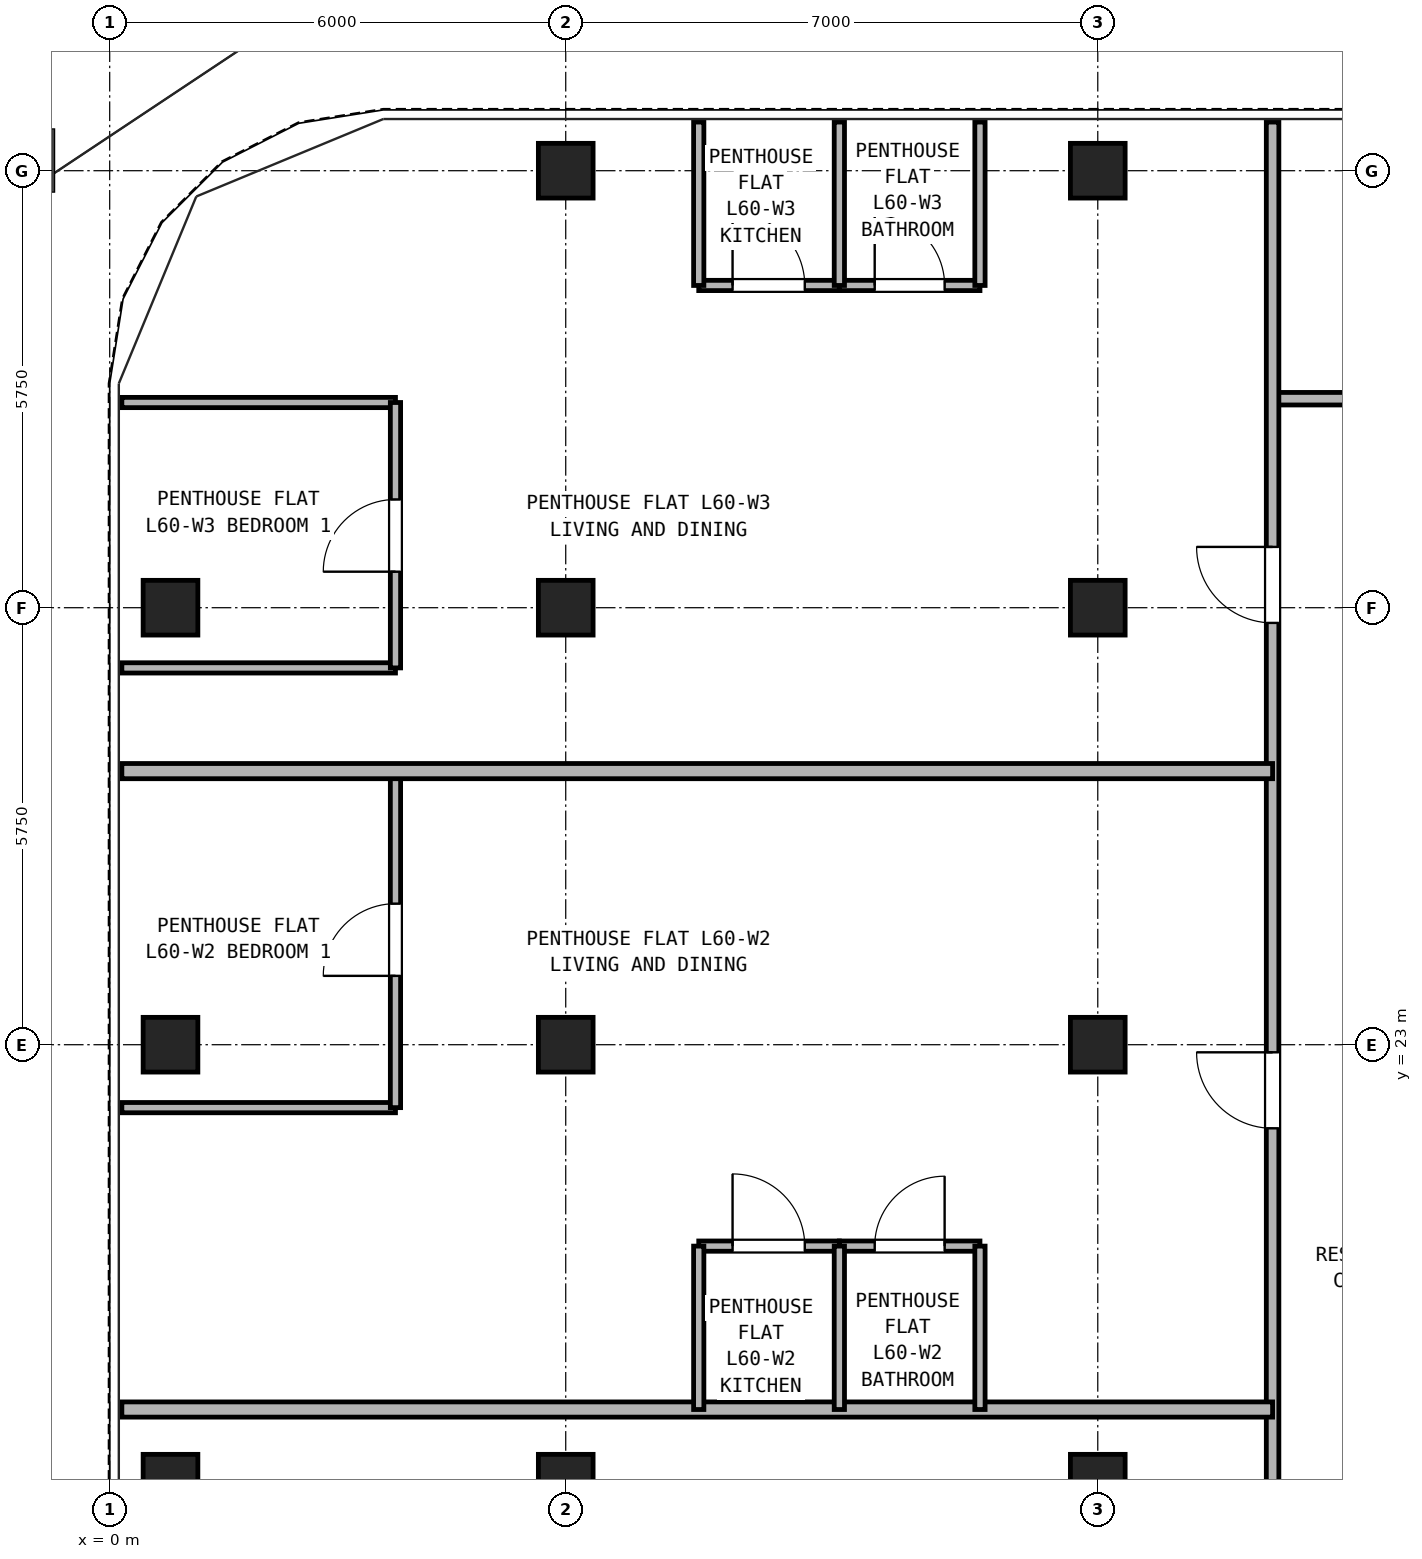
"""IFC4 building model, lengths in metres.
Left out: names, types, materials, properties, quantities, classifications, styles, units other than length and angle.
Written with IfcOpenShell. Run it as: python <this file> out.ifc"""

import sys

from ifc_helpers import new_model, si_unit, direction, frame, frame_2d, origin, origin_2d, place, context, subcontext, project, spatial, rectangle, hollow_rectangle, extrude, source, transform, mapped, element, fill, save


model = new_model("IFC4")
c1 = context("Model", 3, precision=1e-05, world=origin(), true_north=direction((0.0, 1.0)))
c2 = subcontext(c1, "Body", "Model", "MODEL_VIEW")
j1 = project(units=[si_unit("LENGTHUNIT", "METRE"), si_unit("PLANEANGLEUNIT", "RADIAN")], contexts=[c1])
p1 = place(None, origin())
s1 = spatial("IfcSite", under=j1, at=p1, CompositionType="ELEMENT")
p2 = place(p1, origin())
s2 = spatial("IfcBuilding", under=s1, at=p2, CompositionType="ELEMENT")
p3 = place(p2, frame((0.0, 0.0, 212.4)))
s3 = spatial("IfcBuildingStorey", under=s2, at=p3, CompositionType="ELEMENT", Elevation=212.4)
m1 = source(origin(), c2, "Body", "SweptSolid", [
    extrude(hollow_rectangle(XDim=0.72, YDim=0.72, WallThickness=0.04, at=origin_2d()), origin(), (0.0, 0.0, 1.0), 2.84),
])
for number, where, z_axis, x_axis in (
    (1, (6.0, 34.5, 0.0), (0.0, 0.0, 1.0), (1.0, 0.0, 0.0)),
    (2, (13.0, 34.5, 0.0), (0.0, 0.0, 1.0), (1.0, 0.0, 0.0)),
    (3, (0.8, 17.25, 0.0), (0.0, 0.0, 1.0), (1.0, 0.0, 0.0)),
    (4, (0.8, 23.0, 0.0), (0.0, 0.0, 1.0), (1.0, 0.0, 0.0)),
    (5, (0.8, 28.75, 0.0), (0.0, 0.0, 1.0), (1.0, 0.0, 0.0)),
    (6, (6.0, 17.25, 0.0), (0.0, 0.0, 1.0), (1.0, 0.0, 0.0)),
    (7, (6.0, 23.0, 0.0), (0.0, 0.0, 1.0), (1.0, 0.0, 0.0)),
    (8, (6.0, 28.75, 0.0), (0.0, 0.0, 1.0), (1.0, 0.0, 0.0)),
    (9, (13.0, 17.25, 0.0), (0.0, 0.0, 1.0), (1.0, 0.0, 0.0)),
    (10, (13.0, 23.0, 0.0), (0.0, 0.0, 1.0), (1.0, 0.0, 0.0)),
    (11, (13.0, 28.75, 0.0), (0.0, 0.0, 1.0), (1.0, 0.0, 0.0)),
):
    element("IfcColumn", number, at=place(p3, frame(where, z_axis=z_axis, x_axis=x_axis)), inside=s3, PredefinedType="COLUMN", context=c2, shape_type="MappedRepresentation", body=[
        mapped(m1, transform((0.0, 0.0, 0.0), x_axis=(1.0, 0.0, 0.0), y_axis=(0.0, 1.0, 0.0), z_axis=(0.0, 0.0, 1.0), scale=1.0)),
    ])
p4 = place(p3, frame((15.3, 31.5, 0.0), z_axis=(0.0, 0.0, 1.0), x_axis=(1.0, 0.0, 0.0)))
e12 = element("IfcWall", 12, at=p4, inside=s3, PredefinedType="PARTITIONING", context=c2, shape_type="SweptSolid", body=[
    extrude(rectangle(XDim=16.4, YDim=0.165, at=frame_2d((8.2, 0.0))), origin(), (0.0, 0.0, 1.0), 2.473),
])
p5 = place(p4, frame((2.6, 0.0, 0.0)))
e13 = element("IfcOpeningElement", 13, at=p5, cuts=e12, PredefinedType="OPENING", context=c2, shape_type="SweptSolid", body=[
    extrude(rectangle(XDim=0.95, YDim=2.15, at=frame_2d((0.475, 1.075))), frame((0.0, 0.093, 0.0), z_axis=(0.0, -1.0, 0.0), x_axis=(1.0, 0.0, 0.0)), (0.0, 0.0, 1.0), 0.185),
])
p6 = place(p4, frame((7.9, 0.0, 0.0)))
e14 = element("IfcOpeningElement", 14, at=p6, cuts=e12, PredefinedType="OPENING", context=c2, shape_type="SweptSolid", body=[
    extrude(rectangle(XDim=0.95, YDim=2.15, at=frame_2d((0.475, 1.075))), frame((0.0, 0.093, 0.0), z_axis=(0.0, -1.0, 0.0), x_axis=(1.0, 0.0, 0.0)), (0.0, 0.0, 1.0), 0.185),
])
p7 = place(p4, frame((13.0, 0.0, 0.0)))
e15 = element("IfcOpeningElement", 15, at=p7, cuts=e12, PredefinedType="OPENING", context=c2, shape_type="SweptSolid", body=[
    extrude(rectangle(XDim=0.92, YDim=2.1, at=frame_2d((0.46, 1.05))), frame((0.0, 0.093, 0.0), z_axis=(0.0, -1.0, 0.0), x_axis=(1.0, 0.0, 0.0)), (0.0, 0.0, 1.0), 0.185),
])
p8 = place(p3, frame((15.3, 10.75, 0.0), z_axis=(0.0, 0.0, 1.0), x_axis=(0.0, 1.0, 0.0)))
e16 = element("IfcWall", 16, at=p8, inside=s3, PredefinedType="PARTITIONING", context=c2, shape_type="SweptSolid", body=[
    extrude(rectangle(XDim=24.39, YDim=0.165, at=frame_2d((12.195, 0.0))), origin(), (0.0, 0.0, 1.0), 2.84),
])
p9 = place(p8, frame((3.225, 0.0, 0.0)))
e17 = element("IfcOpeningElement", 17, at=p9, cuts=e16, PredefinedType="OPENING", context=c2, shape_type="SweptSolid", body=[
    extrude(rectangle(XDim=1.0, YDim=2.15, at=frame_2d((0.5, 1.075))), frame((0.0, 0.093, 0.0), z_axis=(0.0, -1.0, 0.0), x_axis=(1.0, 0.0, 0.0)), (0.0, 0.0, 1.0), 0.185),
])
p10 = place(p8, frame((11.15, 0.0, 0.0)))
e18 = element("IfcOpeningElement", 18, at=p10, cuts=e16, PredefinedType="OPENING", context=c2, shape_type="SweptSolid", body=[
    extrude(rectangle(XDim=1.0, YDim=2.15, at=frame_2d((0.5, 1.075))), frame((0.0, 0.093, 0.0), z_axis=(0.0, -1.0, 0.0), x_axis=(1.0, 0.0, 0.0)), (0.0, 0.0, 1.0), 0.185),
])
p11 = place(p8, frame((17.8, 0.0, 0.0)))
e19 = element("IfcOpeningElement", 19, at=p11, cuts=e16, PredefinedType="OPENING", context=c2, shape_type="SweptSolid", body=[
    extrude(rectangle(XDim=1.0, YDim=2.15, at=frame_2d((0.5, 1.075))), frame((0.0, 0.093, 0.0), z_axis=(0.0, -1.0, 0.0), x_axis=(1.0, 0.0, 0.0)), (0.0, 0.0, 1.0), 0.185),
])
p12 = place(p3, frame((0.16, 18.2, 0.0), z_axis=(0.0, 0.0, 1.0), x_axis=(1.0, 0.0, 0.0)))
e20 = element("IfcWall", 20, at=p12, inside=s3, PredefinedType="PARTITIONING", context=c2, shape_type="SweptSolid", body=[
    extrude(rectangle(XDim=15.14, YDim=0.2, at=frame_2d((7.57, 0.0))), origin(), (0.0, 0.0, 1.0), 2.84),
])
p13 = place(p3, frame((7.75, 20.35, 0.0), z_axis=(0.0, 0.0, 1.0), x_axis=(1.0, 0.0, 0.0)))
e21 = element("IfcWall", 21, at=p13, inside=s3, PredefinedType="PARTITIONING", context=c2, shape_type="SweptSolid", body=[
    extrude(rectangle(XDim=1.85, YDim=0.135, at=frame_2d((0.925, 0.0))), origin(), (0.0, 0.0, 1.0), 2.473),
])
p14 = place(p13, frame((0.445, 0.0, 0.0)))
e22 = element("IfcOpeningElement", 22, at=p14, cuts=e21, PredefinedType="OPENING", context=c2, shape_type="SweptSolid", body=[
    extrude(rectangle(XDim=0.95, YDim=2.15, at=frame_2d((0.475, 1.075))), frame((0.0, 0.077, 0.0), z_axis=(0.0, -1.0, 0.0), x_axis=(1.0, 0.0, 0.0)), (0.0, 0.0, 1.0), 0.155),
])
p15 = place(p3, frame((9.6, 20.35, 0.0), z_axis=(0.0, 0.0, 1.0), x_axis=(1.0, 0.0, 0.0)))
e23 = element("IfcWall", 23, at=p15, inside=s3, PredefinedType="PARTITIONING", context=c2, shape_type="SweptSolid", body=[
    extrude(rectangle(XDim=1.85, YDim=0.135, at=frame_2d((0.925, 0.0))), origin(), (0.0, 0.0, 1.0), 2.473),
])
p16 = place(p15, frame((0.465, 0.0, 0.0)))
e24 = element("IfcOpeningElement", 24, at=p16, cuts=e23, PredefinedType="OPENING", context=c2, shape_type="SweptSolid", body=[
    extrude(rectangle(XDim=0.92, YDim=2.1, at=frame_2d((0.46, 1.05))), frame((0.0, 0.077, 0.0), z_axis=(0.0, -1.0, 0.0), x_axis=(1.0, 0.0, 0.0)), (0.0, 0.0, 1.0), 0.155),
])
for number, where, z_axis, x_axis in (
    (25, (7.75, 18.2, 0.0), (0.0, 0.0, 1.0), (0.0, 1.0, 0.0)),
    (26, (9.6, 18.2, 0.0), (0.0, 0.0, 1.0), (0.0, 1.0, 0.0)),
    (27, (11.45, 18.2, 0.0), (0.0, 0.0, 1.0), (0.0, 1.0, 0.0)),
):
    element("IfcWall", number, at=place(p3, frame(where, z_axis=z_axis, x_axis=x_axis)), inside=s3, PredefinedType="PARTITIONING", context=c2, shape_type="SweptSolid", body=[
        extrude(rectangle(XDim=2.15, YDim=0.135, at=frame_2d((1.075, 0.0))), origin(), (0.0, 0.0, 1.0), 2.84),
    ])
p17 = place(p3, frame((0.16, 22.172, 0.0), z_axis=(0.0, 0.0, 1.0), x_axis=(1.0, 0.0, 0.0)))
e28 = element("IfcWall", 28, at=p17, inside=s3, PredefinedType="PARTITIONING", context=c2, shape_type="SweptSolid", body=[
    extrude(rectangle(XDim=3.6, YDim=0.135, at=frame_2d((1.8, 0.0))), origin(), (0.0, 0.0, 1.0), 2.84),
])
p18 = place(p3, frame((3.76, 22.172, 0.0), z_axis=(0.0, 0.0, 1.0), x_axis=(0.0, 1.0, 0.0)))
e29 = element("IfcWall", 29, at=p18, inside=s3, PredefinedType="PARTITIONING", context=c2, shape_type="SweptSolid", body=[
    extrude(rectangle(XDim=4.428, YDim=0.135, at=frame_2d((2.214, 0.0))), origin(), (0.0, 0.0, 1.0), 2.84),
])
p19 = place(p18, frame((1.734, 0.0, 0.0)))
e30 = element("IfcOpeningElement", 30, at=p19, cuts=e29, PredefinedType="OPENING", context=c2, shape_type="SweptSolid", body=[
    extrude(rectangle(XDim=0.95, YDim=2.15, at=frame_2d((0.475, 1.075))), frame((0.0, 0.077, 0.0), z_axis=(0.0, -1.0, 0.0), x_axis=(1.0, 0.0, 0.0)), (0.0, 0.0, 1.0), 0.155),
])
p20 = place(p3, frame((0.16, 26.6, 0.0), z_axis=(0.0, 0.0, 1.0), x_axis=(1.0, 0.0, 0.0)))
e31 = element("IfcWall", 31, at=p20, inside=s3, PredefinedType="PARTITIONING", context=c2, shape_type="SweptSolid", body=[
    extrude(rectangle(XDim=15.14, YDim=0.2, at=frame_2d((7.57, 0.0))), origin(), (0.0, 0.0, 1.0), 2.84),
])
p21 = place(p3, frame((7.75, 32.99, 0.0), z_axis=(0.0, 0.0, 1.0), x_axis=(1.0, 0.0, 0.0)))
e32 = element("IfcWall", 32, at=p21, inside=s3, PredefinedType="PARTITIONING", context=c2, shape_type="SweptSolid", body=[
    extrude(rectangle(XDim=1.85, YDim=0.135, at=frame_2d((0.925, 0.0))), origin(), (0.0, 0.0, 1.0), 2.84),
])
p22 = place(p21, frame((0.445, 0.0, 0.0)))
e33 = element("IfcOpeningElement", 33, at=p22, cuts=e32, PredefinedType="OPENING", context=c2, shape_type="SweptSolid", body=[
    extrude(rectangle(XDim=0.95, YDim=2.15, at=frame_2d((0.475, 1.075))), frame((0.0, 0.077, 0.0), z_axis=(0.0, -1.0, 0.0), x_axis=(1.0, 0.0, 0.0)), (0.0, 0.0, 1.0), 0.155),
])
p23 = place(p3, frame((9.6, 32.99, 0.0), z_axis=(0.0, 0.0, 1.0), x_axis=(1.0, 0.0, 0.0)))
e34 = element("IfcWall", 34, at=p23, inside=s3, PredefinedType="PARTITIONING", context=c2, shape_type="SweptSolid", body=[
    extrude(rectangle(XDim=1.85, YDim=0.135, at=frame_2d((0.925, 0.0))), origin(), (0.0, 0.0, 1.0), 2.84),
])
p24 = place(p23, frame((0.465, 0.0, 0.0)))
e35 = element("IfcOpeningElement", 35, at=p24, cuts=e34, PredefinedType="OPENING", context=c2, shape_type="SweptSolid", body=[
    extrude(rectangle(XDim=0.92, YDim=2.1, at=frame_2d((0.46, 1.05))), frame((0.0, 0.077, 0.0), z_axis=(0.0, -1.0, 0.0), x_axis=(1.0, 0.0, 0.0)), (0.0, 0.0, 1.0), 0.155),
])
for number, where, z_axis, x_axis in (
    (36, (7.75, 32.99, 0.0), (0.0, 0.0, 1.0), (0.0, 1.0, 0.0)),
    (37, (9.6, 32.99, 0.0), (0.0, 0.0, 1.0), (0.0, 1.0, 0.0)),
    (38, (11.45, 32.99, 0.0), (0.0, 0.0, 1.0), (0.0, 1.0, 0.0)),
):
    element("IfcWall", number, at=place(p3, frame(where, z_axis=z_axis, x_axis=x_axis)), inside=s3, PredefinedType="PARTITIONING", context=c2, shape_type="SweptSolid", body=[
        extrude(rectangle(XDim=2.15, YDim=0.135, at=frame_2d((1.075, 0.0))), origin(), (0.0, 0.0, 1.0), 2.84),
    ])
for number, where, z_axis, x_axis in (
    (39, (0.16, 27.958, 0.0), (0.0, 0.0, 1.0), (1.0, 0.0, 0.0)),
    (40, (0.16, 31.45, 0.0), (0.0, 0.0, 1.0), (1.0, 0.0, 0.0)),
):
    element("IfcWall", number, at=place(p3, frame(where, z_axis=z_axis, x_axis=x_axis)), inside=s3, PredefinedType="PARTITIONING", context=c2, shape_type="SweptSolid", body=[
        extrude(rectangle(XDim=3.6, YDim=0.135, at=frame_2d((1.8, 0.0))), origin(), (0.0, 0.0, 1.0), 2.84),
    ])
p25 = place(p3, frame((3.76, 27.958, 0.0), z_axis=(0.0, 0.0, 1.0), x_axis=(0.0, 1.0, 0.0)))
e41 = element("IfcWall", 41, at=p25, inside=s3, PredefinedType="PARTITIONING", context=c2, shape_type="SweptSolid", body=[
    extrude(rectangle(XDim=3.492, YDim=0.135, at=frame_2d((1.746, 0.0))), origin(), (0.0, 0.0, 1.0), 2.84),
])
p26 = place(p25, frame((1.266, 0.0, 0.0)))
e42 = element("IfcOpeningElement", 42, at=p26, cuts=e41, PredefinedType="OPENING", context=c2, shape_type="SweptSolid", body=[
    extrude(rectangle(XDim=0.95, YDim=2.15, at=frame_2d((0.475, 1.075))), frame((0.0, 0.077, 0.0), z_axis=(0.0, -1.0, 0.0), x_axis=(1.0, 0.0, 0.0)), (0.0, 0.0, 1.0), 0.155),
])
p27 = place(p14, origin())
e43 = element("IfcDoor", 43, at=p27, inside=s3, OperationType="SINGLE_SWING_LEFT", PredefinedType="DOOR", context=c2, shape_type="SweptSolid", body=[
    extrude(rectangle(XDim=0.95, YDim=2.15, at=frame_2d((0.475, 1.075))), frame((0.0, 0.025, 0.0), z_axis=(0.0, -1.0, 0.0), x_axis=(1.0, 0.0, 0.0)), (0.0, 0.0, 1.0), 0.05),
])
fill(e22, e43)
p28 = place(p16, origin())
e44 = element("IfcDoor", 44, at=p28, inside=s3, OperationType="SINGLE_SWING_RIGHT", PredefinedType="DOOR", context=c2, shape_type="SweptSolid", body=[
    extrude(rectangle(XDim=0.92, YDim=2.1, at=frame_2d((0.46, 1.05))), frame((0.0, 0.025, 0.0), z_axis=(0.0, -1.0, 0.0), x_axis=(1.0, 0.0, 0.0)), (0.0, 0.0, 1.0), 0.05),
])
fill(e24, e44)
p29 = place(p19, origin())
e45 = element("IfcDoor", 45, at=p29, inside=s3, OperationType="SINGLE_SWING_LEFT", PredefinedType="DOOR", context=c2, shape_type="SweptSolid", body=[
    extrude(rectangle(XDim=0.95, YDim=2.15, at=frame_2d((0.475, 1.075))), frame((0.0, 0.025, 0.0), z_axis=(0.0, -1.0, 0.0), x_axis=(1.0, 0.0, 0.0)), (0.0, 0.0, 1.0), 0.05),
])
fill(e30, e45)
p30 = place(p10, origin())
e46 = element("IfcDoor", 46, at=p30, inside=s3, OperationType="SINGLE_SWING_RIGHT", PredefinedType="DOOR", context=c2, shape_type="SweptSolid", body=[
    extrude(rectangle(XDim=1.0, YDim=2.15, at=frame_2d((0.5, 1.075))), frame((0.0, 0.025, 0.0), z_axis=(0.0, -1.0, 0.0), x_axis=(1.0, 0.0, 0.0)), (0.0, 0.0, 1.0), 0.05),
])
fill(e18, e46)
p31 = place(p22, frame((0.95, 0.0, 0.0), z_axis=(0.0, 0.0, 1.0), x_axis=(-1.0, 0.0, 0.0)))
e47 = element("IfcDoor", 47, at=p31, inside=s3, OperationType="SINGLE_SWING_LEFT", PredefinedType="DOOR", context=c2, shape_type="SweptSolid", body=[
    extrude(rectangle(XDim=0.95, YDim=2.15, at=frame_2d((0.475, 1.075))), frame((0.0, 0.025, 0.0), z_axis=(0.0, -1.0, 0.0), x_axis=(1.0, 0.0, 0.0)), (0.0, 0.0, 1.0), 0.05),
])
fill(e33, e47)
p32 = place(p24, frame((0.92, 0.0, 0.0), z_axis=(0.0, 0.0, 1.0), x_axis=(-1.0, 0.0, 0.0)))
e48 = element("IfcDoor", 48, at=p32, inside=s3, OperationType="SINGLE_SWING_LEFT", PredefinedType="DOOR", context=c2, shape_type="SweptSolid", body=[
    extrude(rectangle(XDim=0.92, YDim=2.1, at=frame_2d((0.46, 1.05))), frame((0.0, 0.025, 0.0), z_axis=(0.0, -1.0, 0.0), x_axis=(1.0, 0.0, 0.0)), (0.0, 0.0, 1.0), 0.05),
])
fill(e35, e48)
p33 = place(p26, origin())
e49 = element("IfcDoor", 49, at=p33, inside=s3, OperationType="SINGLE_SWING_LEFT", PredefinedType="DOOR", context=c2, shape_type="SweptSolid", body=[
    extrude(rectangle(XDim=0.95, YDim=2.15, at=frame_2d((0.475, 1.075))), frame((0.0, 0.025, 0.0), z_axis=(0.0, -1.0, 0.0), x_axis=(1.0, 0.0, 0.0)), (0.0, 0.0, 1.0), 0.05),
])
fill(e42, e49)
p34 = place(p11, origin())
e50 = element("IfcDoor", 50, at=p34, inside=s3, OperationType="SINGLE_SWING_RIGHT", PredefinedType="DOOR", context=c2, shape_type="SweptSolid", body=[
    extrude(rectangle(XDim=1.0, YDim=2.15, at=frame_2d((0.5, 1.075))), frame((0.0, 0.025, 0.0), z_axis=(0.0, -1.0, 0.0), x_axis=(1.0, 0.0, 0.0)), (0.0, 0.0, 1.0), 0.05),
])
fill(e19, e50)
save(model, sys.argv[1])
